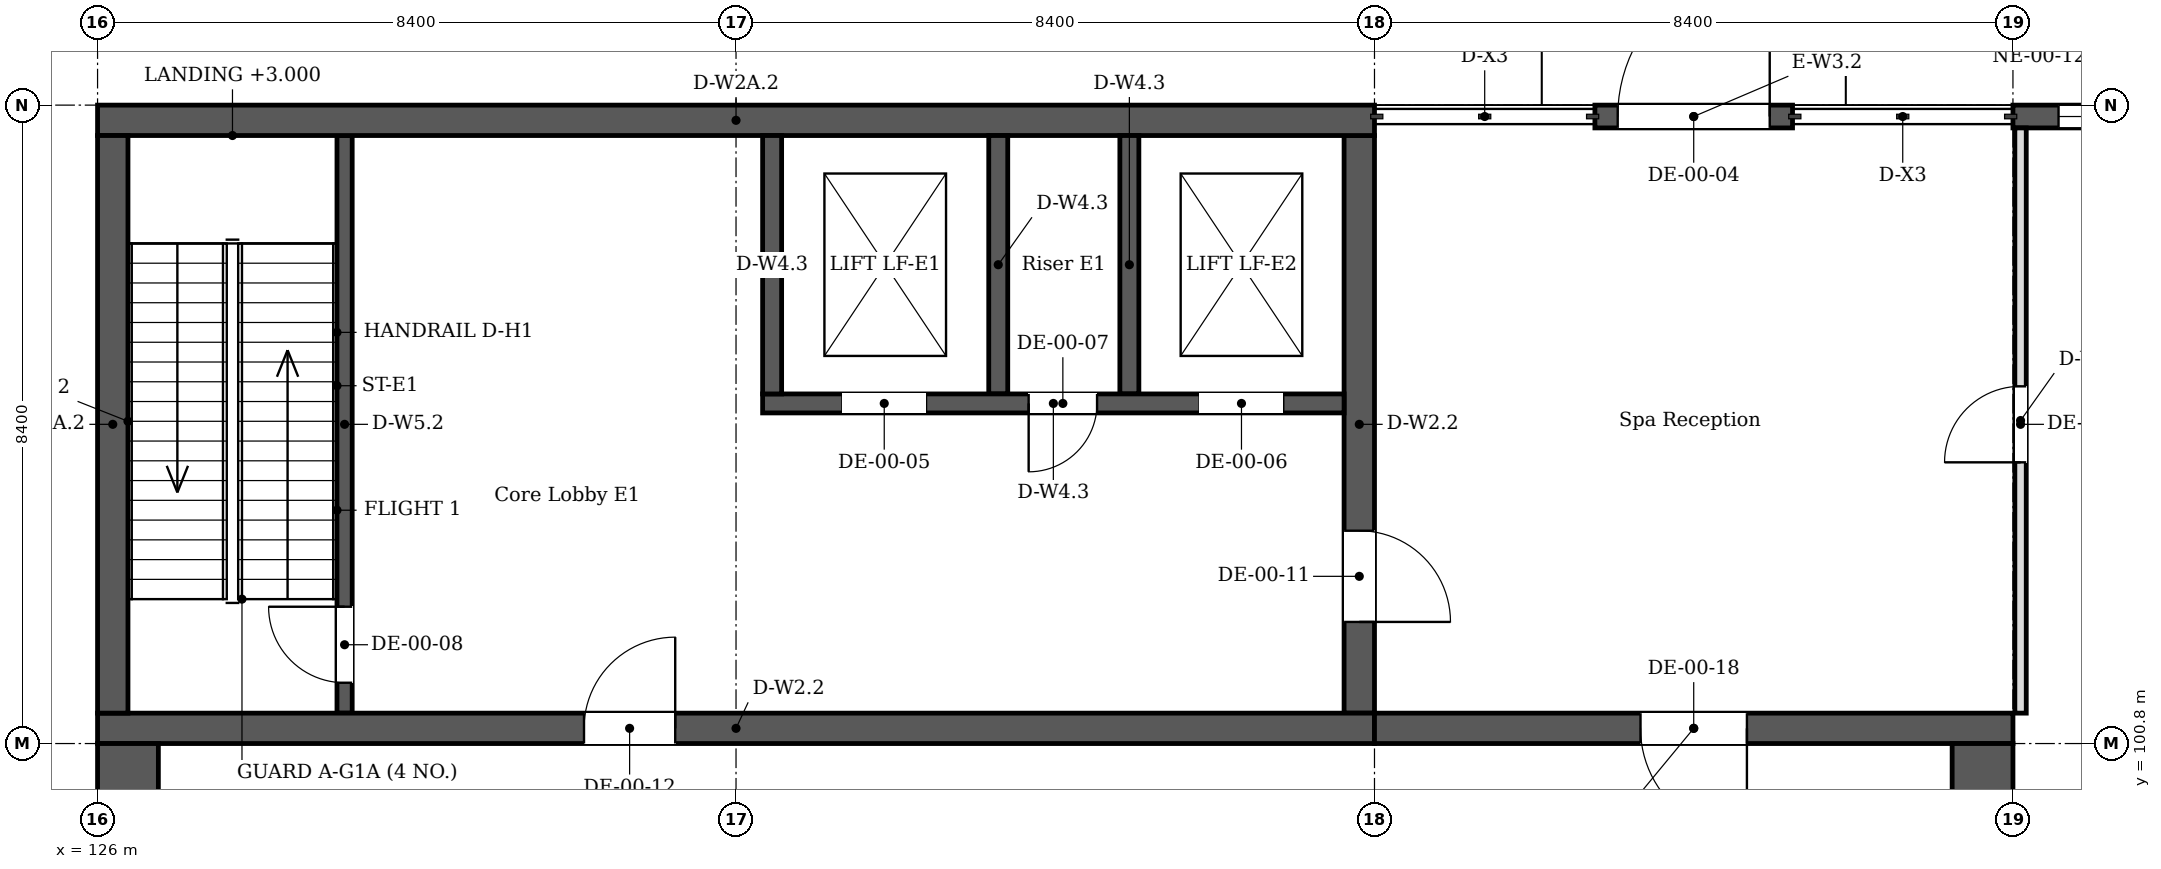
"""IFC4 building model, lengths in metres.
Left out: names, types, materials, properties, quantities, classifications, styles, units other than length and angle.
Written with IfcOpenShell. Run it as: python <this file> out.ifc"""

import sys

from ifc_helpers import new_model, si_unit, direction, frame, frame_2d, origin, place, context, subcontext, project, spatial, rectangle, extrude, element, fill, save


model = new_model("IFC4")
c1 = context("Model", 3, precision=1e-05, world=origin(), true_north=direction((0.0, 1.0)))
c2 = subcontext(c1, "Body", "Model", "MODEL_VIEW")
j1 = project(units=[si_unit("LENGTHUNIT", "METRE"), si_unit("PLANEANGLEUNIT", "RADIAN")], contexts=[c1])
p1 = place(None, origin())
s1 = spatial("IfcSite", under=j1, at=p1, CompositionType="ELEMENT")
p2 = place(p1, origin())
s2 = spatial("IfcBuilding", under=s1, at=p2, CompositionType="ELEMENT")
p3 = place(p2, origin())
s3 = spatial("IfcBuildingStorey", under=s2, at=p3, CompositionType="ELEMENT", Elevation=0.0)
p4 = place(p3, frame((126.4, 75.8, 0.0), z_axis=(0.0, 0.0, 1.0), x_axis=(0.0, 1.0, 0.0)))
e1 = element("IfcWall", 1, at=p4, inside=s3, PredefinedType="SOLIDWALL", context=c2, shape_type="SweptSolid", body=[
    extrude(rectangle(XDim=25.0, YDim=0.8, at=frame_2d((12.5, 0.0))), origin(), (0.0, 0.0, 1.0), 5.963),
])
p5 = place(p4, frame((3.6, 0.0, 0.0)))
e2 = element("IfcOpeningElement", 2, at=p5, cuts=e1, PredefinedType="OPENING", context=c2, shape_type="SweptSolid", body=[
    extrude(rectangle(XDim=1.2, YDim=2.1, at=frame_2d((0.6, 1.05))), frame((0.0, 0.41, 0.0), z_axis=(0.0, -1.0, 0.0), x_axis=(1.0, 0.0, 0.0)), (0.0, 0.0, 1.0), 0.82),
])
p6 = place(p4, frame((19.6, 0.0, 0.0)))
e3 = element("IfcOpeningElement", 3, at=p6, cuts=e1, PredefinedType="OPENING", context=c2, shape_type="SweptSolid", body=[
    extrude(rectangle(XDim=1.2, YDim=2.1, at=frame_2d((0.6, 1.05))), frame((0.0, 0.41, 0.0), z_axis=(0.0, -1.0, 0.0), x_axis=(1.0, 0.0, 0.0)), (0.0, 0.0, 1.0), 0.82),
])
p7 = place(p4, frame((7.0, 0.0, 3.8)))
e4 = element("IfcOpeningElement", 4, at=p7, cuts=e1, PredefinedType="OPENING", context=c2, shape_type="SweptSolid", body=[
    extrude(rectangle(XDim=2.4, YDim=1.2, at=frame_2d((1.2, 0.6))), frame((0.0, 0.41, 0.0), z_axis=(0.0, -1.0, 0.0), x_axis=(1.0, 0.0, 0.0)), (0.0, 0.0, 1.0), 0.82),
])
p8 = place(p4, frame((15.0, 0.0, 3.8)))
e5 = element("IfcOpeningElement", 5, at=p8, cuts=e1, PredefinedType="OPENING", context=c2, shape_type="SweptSolid", body=[
    extrude(rectangle(XDim=2.4, YDim=1.2, at=frame_2d((1.2, 0.6))), frame((0.0, 0.41, 0.0), z_axis=(0.0, -1.0, 0.0), x_axis=(1.0, 0.0, 0.0)), (0.0, 0.0, 1.0), 0.82),
])
p9 = place(p3, frame((150.8, 75.8, 0.0), z_axis=(0.0, 0.0, 1.0), x_axis=(0.0, 1.0, 0.0)))
e6 = element("IfcWall", 6, at=p9, inside=s3, PredefinedType="SOLIDWALL", context=c2, shape_type="SweptSolid", body=[
    extrude(rectangle(XDim=25.0, YDim=0.8, at=frame_2d((12.5, 0.0))), origin(), (0.0, 0.0, 1.0), 5.963),
])
p10 = place(p9, frame((9.0, 0.0, 3.8)))
e7 = element("IfcOpeningElement", 7, at=p10, cuts=e6, PredefinedType="OPENING", context=c2, shape_type="SweptSolid", body=[
    extrude(rectangle(XDim=2.4, YDim=1.2, at=frame_2d((1.2, 0.6))), frame((0.0, 0.41, 0.0), z_axis=(0.0, -1.0, 0.0), x_axis=(1.0, 0.0, 0.0)), (0.0, 0.0, 1.0), 0.82),
])
p11 = place(p9, frame((17.0, 0.0, 3.8)))
e8 = element("IfcOpeningElement", 8, at=p11, cuts=e6, PredefinedType="OPENING", context=c2, shape_type="SweptSolid", body=[
    extrude(rectangle(XDim=2.4, YDim=1.2, at=frame_2d((1.2, 0.6))), frame((0.0, 0.41, 0.0), z_axis=(0.0, -1.0, 0.0), x_axis=(1.0, 0.0, 0.0)), (0.0, 0.0, 1.0), 0.82),
])
p12 = place(p9, frame((11.5, 0.0, 0.0)))
e9 = element("IfcOpeningElement", 9, at=p12, cuts=e6, PredefinedType="OPENING", context=c2, shape_type="SweptSolid", body=[
    extrude(rectangle(XDim=1.4, YDim=2.4, at=frame_2d((0.7, 1.2))), frame((0.0, 0.41, 0.0), z_axis=(0.0, -1.0, 0.0), x_axis=(1.0, 0.0, 0.0)), (0.0, 0.0, 1.0), 0.82),
])
p13 = place(p9, frame((19.5, 0.0, 0.0)))
e10 = element("IfcOpeningElement", 10, at=p13, cuts=e6, PredefinedType="OPENING", context=c2, shape_type="SweptSolid", body=[
    extrude(rectangle(XDim=1.4, YDim=2.4, at=frame_2d((0.7, 1.2))), frame((0.0, 0.41, 0.0), z_axis=(0.0, -1.0, 0.0), x_axis=(1.0, 0.0, 0.0)), (0.0, 0.0, 1.0), 0.82),
])
p14 = place(p3, frame((126.0, 101.0, 0.0), z_axis=(0.0, 0.0, 1.0), x_axis=(1.0, 0.0, 0.0)))
e11 = element("IfcWall", 11, at=p14, inside=s3, PredefinedType="SOLIDWALL", context=c2, shape_type="SweptSolid", body=[
    extrude(rectangle(XDim=16.8, YDim=0.4, at=frame_2d((8.4, 0.0))), origin(), (0.0, 0.0, 1.0), 5.72),
])
p15 = place(p14, frame((6.4, 0.0, 0.0)))
e12 = element("IfcOpeningElement", 12, at=p15, cuts=e11, PredefinedType="OPENING", context=c2, shape_type="SweptSolid", body=[
    extrude(rectangle(XDim=1.2, YDim=2.1, at=frame_2d((0.6, 1.05))), frame((0.0, 0.21, 0.0), z_axis=(0.0, -1.0, 0.0), x_axis=(1.0, 0.0, 0.0)), (0.0, 0.0, 1.0), 0.42),
])
p16 = place(p3, frame((126.0, 109.0, 0.0), z_axis=(0.0, 0.0, 1.0), x_axis=(1.0, 0.0, 0.0)))
e13 = element("IfcWall", 13, at=p16, inside=s3, PredefinedType="SOLIDWALL", context=c2, shape_type="SweptSolid", body=[
    extrude(rectangle(XDim=16.8, YDim=0.4, at=frame_2d((8.4, 0.0))), origin(), (0.0, 0.0, 1.0), 5.72),
])
p17 = place(p3, frame((126.2, 101.2, 0.0), z_axis=(0.0, 0.0, 1.0), x_axis=(0.0, 1.0, 0.0)))
e14 = element("IfcWall", 14, at=p17, inside=s3, PredefinedType="SOLIDWALL", context=c2, shape_type="SweptSolid", body=[
    extrude(rectangle(XDim=7.6, YDim=0.4, at=frame_2d((3.8, 0.0))), origin(), (0.0, 0.0, 1.0), 5.72),
])
p18 = place(p3, frame((142.6, 101.2, 0.0), z_axis=(0.0, 0.0, 1.0), x_axis=(0.0, 1.0, 0.0)))
e15 = element("IfcWall", 15, at=p18, inside=s3, PredefinedType="SOLIDWALL", context=c2, shape_type="SweptSolid", body=[
    extrude(rectangle(XDim=7.6, YDim=0.4, at=frame_2d((3.8, 0.0))), origin(), (0.0, 0.0, 1.0), 5.72),
])
p19 = place(p18, frame((1.2, 0.0, 0.0)))
e16 = element("IfcOpeningElement", 16, at=p19, cuts=e15, PredefinedType="OPENING", context=c2, shape_type="SweptSolid", body=[
    extrude(rectangle(XDim=1.2, YDim=2.1, at=frame_2d((0.6, 1.05))), frame((0.0, 0.21, 0.0), z_axis=(0.0, -1.0, 0.0), x_axis=(1.0, 0.0, 0.0)), (0.0, 0.0, 1.0), 0.42),
])
p20 = place(p3, frame((129.25, 101.2, 0.0), z_axis=(0.0, 0.0, 1.0), x_axis=(0.0, 1.0, 0.0)))
e17 = element("IfcWall", 17, at=p20, inside=s3, PredefinedType="SOLIDWALL", context=c2, shape_type="SweptSolid", body=[
    extrude(rectangle(XDim=7.6, YDim=0.2, at=frame_2d((3.8, 0.0))), origin(), (0.0, 0.0, 1.0), 5.72),
])
p21 = place(p20, frame((0.4, 0.0, 0.0)))
e18 = element("IfcOpeningElement", 18, at=p21, cuts=e17, PredefinedType="OPENING", context=c2, shape_type="SweptSolid", body=[
    extrude(rectangle(XDim=1.0, YDim=2.1, at=frame_2d((0.5, 1.05))), frame((0.0, 0.11, 0.0), z_axis=(0.0, -1.0, 0.0), x_axis=(1.0, 0.0, 0.0)), (0.0, 0.0, 1.0), 0.22),
])
p22 = place(p3, frame((142.8, 101.0, 0.0), z_axis=(0.0, 0.0, 1.0), x_axis=(1.0, 0.0, 0.0)))
e19 = element("IfcWall", 19, at=p22, inside=s3, PredefinedType="SOLIDWALL", context=c2, shape_type="SweptSolid", body=[
    extrude(rectangle(XDim=8.4, YDim=0.4, at=frame_2d((4.2, 0.0))), origin(), (0.0, 0.0, 1.0), 5.72),
])
p23 = place(p22, frame((3.5, 0.0, 0.0)))
e20 = element("IfcOpeningElement", 20, at=p23, cuts=e19, PredefinedType="OPENING", context=c2, shape_type="SweptSolid", body=[
    extrude(rectangle(XDim=1.4, YDim=2.4, at=frame_2d((0.7, 1.2))), frame((0.0, 0.21, 0.0), z_axis=(0.0, -1.0, 0.0), x_axis=(1.0, 0.0, 0.0)), (0.0, 0.0, 1.0), 0.42),
])
p24 = place(p3, frame((134.75, 105.275, -1.4), z_axis=(0.0, 0.0, 1.0), x_axis=(1.0, 0.0, 0.0)))
e21 = element("IfcWall", 21, at=p24, inside=s3, PredefinedType="SOLIDWALL", context=c2, shape_type="SweptSolid", body=[
    extrude(rectangle(XDim=7.65, YDim=0.25, at=frame_2d((3.825, 0.0))), origin(), (0.0, 0.0, 1.0), 7.12),
])
p25 = place(p24, frame((1.05, 0.0, 1.4)))
e22 = element("IfcOpeningElement", 22, at=p25, cuts=e21, PredefinedType="OPENING", context=c2, shape_type="SweptSolid", body=[
    extrude(rectangle(XDim=1.1, YDim=2.1, at=frame_2d((0.55, 1.05))), frame((0.0, 0.135, 0.0), z_axis=(0.0, -1.0, 0.0), x_axis=(1.0, 0.0, 0.0)), (0.0, 0.0, 1.0), 0.27),
])
p26 = place(p24, frame((5.75, 0.0, 1.4)))
e23 = element("IfcOpeningElement", 23, at=p26, cuts=e21, PredefinedType="OPENING", context=c2, shape_type="SweptSolid", body=[
    extrude(rectangle(XDim=1.1, YDim=2.1, at=frame_2d((0.55, 1.05))), frame((0.0, 0.135, 0.0), z_axis=(0.0, -1.0, 0.0), x_axis=(1.0, 0.0, 0.0)), (0.0, 0.0, 1.0), 0.27),
])
p27 = place(p24, frame((3.5, 0.0, 1.4)))
e24 = element("IfcOpeningElement", 24, at=p27, cuts=e21, PredefinedType="OPENING", context=c2, shape_type="SweptSolid", body=[
    extrude(rectangle(XDim=0.9, YDim=2.1, at=frame_2d((0.45, 1.05))), frame((0.0, 0.135, 0.0), z_axis=(0.0, -1.0, 0.0), x_axis=(1.0, 0.0, 0.0)), (0.0, 0.0, 1.0), 0.27),
])
for number, where, z_axis, x_axis in (
    (25, (134.875, 105.4, -1.4), (0.0, 0.0, 1.0), (0.0, 1.0, 0.0)),
    (26, (137.85, 105.4, -1.4), (0.0, 0.0, 1.0), (0.0, 1.0, 0.0)),
    (27, (139.575, 105.4, -1.4), (0.0, 0.0, 1.0), (0.0, 1.0, 0.0)),
):
    element("IfcWall", number, at=place(p3, frame(where, z_axis=z_axis, x_axis=x_axis)), inside=s3, PredefinedType="SOLIDWALL", context=c2, shape_type="SweptSolid", body=[
        extrude(rectangle(XDim=3.4, YDim=0.25, at=frame_2d((1.7, 0.0))), origin(), (0.0, 0.0, 1.0), 7.12),
    ])
p28 = place(p3, frame((145.7, 109.05, 0.0), z_axis=(0.0, 0.0, 1.0), x_axis=(1.0, 0.0, 0.0)))
e28 = element("IfcWall", 28, at=p28, inside=s3, PredefinedType="SOLIDWALL", context=c2, shape_type="SweptSolid", body=[
    extrude(rectangle(XDim=2.6, YDim=0.3, at=frame_2d((1.3, 0.0))), origin(), (0.0, 0.0, 1.0), 5.72),
])
p29 = place(p28, frame((0.3, 0.0, 0.0)))
e29 = element("IfcOpeningElement", 29, at=p29, cuts=e28, PredefinedType="OPENING", context=c2, shape_type="SweptSolid", body=[
    extrude(rectangle(XDim=2.0, YDim=2.4, at=frame_2d((1.0, 1.2))), frame((0.0, 0.16, 0.0), z_axis=(0.0, -1.0, 0.0), x_axis=(1.0, 0.0, 0.0)), (0.0, 0.0, 1.0), 0.32),
])
p30 = place(p3, frame((151.2, 109.05, 0.0), z_axis=(0.0, 0.0, 1.0), x_axis=(1.0, 0.0, 0.0)))
e30 = element("IfcWall", 30, at=p30, inside=s3, PredefinedType="SOLIDWALL", context=c2, shape_type="SweptSolid", body=[
    extrude(rectangle(XDim=6.0, YDim=0.3, at=frame_2d((3.0, 0.0))), origin(), (0.0, 0.0, 1.0), 5.72),
])
p31 = place(p30, frame((0.6, 0.0, 1.5)))
e31 = element("IfcOpeningElement", 31, at=p31, cuts=e30, PredefinedType="OPENING", context=c2, shape_type="SweptSolid", body=[
    extrude(rectangle(XDim=1.2, YDim=1.2, at=frame_2d((0.6, 0.6))), frame((0.0, 0.16, 0.0), z_axis=(0.0, -1.0, 0.0), x_axis=(1.0, 0.0, 0.0)), (0.0, 0.0, 1.0), 0.32),
])
p32 = place(p30, frame((3.7, 0.0, 1.5)))
e32 = element("IfcOpeningElement", 32, at=p32, cuts=e30, PredefinedType="OPENING", context=c2, shape_type="SweptSolid", body=[
    extrude(rectangle(XDim=1.2, YDim=1.2, at=frame_2d((0.6, 0.6))), frame((0.0, 0.16, 0.0), z_axis=(0.0, -1.0, 0.0), x_axis=(1.0, 0.0, 0.0)), (0.0, 0.0, 1.0), 0.32),
])
p33 = place(p3, frame((151.3, 101.2, 0.0), z_axis=(0.0, 0.0, 1.0), x_axis=(0.0, 1.0, 0.0)))
e33 = element("IfcWall", 33, at=p33, inside=s3, PredefinedType="PARTITIONING", context=c2, shape_type="SweptSolid", body=[
    extrude(rectangle(XDim=7.7, YDim=0.15, at=frame_2d((3.85, 0.0))), origin(), (0.0, 0.0, 1.0), 5.72),
])
p34 = place(p33, frame((3.3, 0.0, 0.0)))
e34 = element("IfcOpeningElement", 34, at=p34, cuts=e33, PredefinedType="OPENING", context=c2, shape_type="SweptSolid", body=[
    extrude(rectangle(XDim=1.0, YDim=2.1, at=frame_2d((0.5, 1.05))), frame((0.0, 0.085, 0.0), z_axis=(0.0, -1.0, 0.0), x_axis=(1.0, 0.0, 0.0)), (0.0, 0.0, 1.0), 0.17),
])
p35 = place(p29, origin())
e35 = element("IfcDoor", 35, at=p35, inside=s3, OperationType="DOUBLE_DOOR_SINGLE_SWING", PredefinedType="DOOR", context=c2, shape_type="SweptSolid", body=[
    extrude(rectangle(XDim=2.0, YDim=2.4, at=frame_2d((1.0, 1.2))), frame((0.0, 0.025, 0.0), z_axis=(0.0, -1.0, 0.0), x_axis=(1.0, 0.0, 0.0)), (0.0, 0.0, 1.0), 0.05),
])
fill(e29, e35)
p36 = place(p31, origin())
e36 = element("IfcWindow", 36, at=p36, inside=s3, PartitioningType="SINGLE_PANEL", PredefinedType="WINDOW", context=c2, shape_type="SweptSolid", body=[
    extrude(rectangle(XDim=1.2, YDim=1.2, at=frame_2d((0.6, 0.6))), frame((0.0, 0.03, 0.0), z_axis=(0.0, -1.0, 0.0), x_axis=(1.0, 0.0, 0.0)), (0.0, 0.0, 1.0), 0.06),
])
fill(e31, e36)
p37 = place(p25, origin())
e37 = element("IfcDoor", 37, at=p37, inside=s3, OperationType="DOUBLE_DOOR_SLIDING", PredefinedType="DOOR", context=c2, shape_type="SweptSolid", body=[
    extrude(rectangle(XDim=1.1, YDim=2.1, at=frame_2d((0.55, 1.05))), frame((0.0, 0.025, 0.0), z_axis=(0.0, -1.0, 0.0), x_axis=(1.0, 0.0, 0.0)), (0.0, 0.0, 1.0), 0.05),
])
fill(e22, e37)
p38 = place(p26, origin())
e38 = element("IfcDoor", 38, at=p38, inside=s3, OperationType="DOUBLE_DOOR_SLIDING", PredefinedType="DOOR", context=c2, shape_type="SweptSolid", body=[
    extrude(rectangle(XDim=1.1, YDim=2.1, at=frame_2d((0.55, 1.05))), frame((0.0, 0.025, 0.0), z_axis=(0.0, -1.0, 0.0), x_axis=(1.0, 0.0, 0.0)), (0.0, 0.0, 1.0), 0.05),
])
fill(e23, e38)
p39 = place(p27, origin())
e39 = element("IfcDoor", 39, at=p39, inside=s3, OperationType="SINGLE_SWING_LEFT", PredefinedType="DOOR", context=c2, shape_type="SweptSolid", body=[
    extrude(rectangle(XDim=0.9, YDim=2.1, at=frame_2d((0.45, 1.05))), frame((0.0, 0.025, 0.0), z_axis=(0.0, -1.0, 0.0), x_axis=(1.0, 0.0, 0.0)), (0.0, 0.0, 1.0), 0.05),
])
fill(e24, e39)
p40 = place(p21, origin())
e40 = element("IfcDoor", 40, at=p40, inside=s3, OperationType="SINGLE_SWING_LEFT", PredefinedType="DOOR", context=c2, shape_type="SweptSolid", body=[
    extrude(rectangle(XDim=1.0, YDim=2.1, at=frame_2d((0.5, 1.05))), frame((0.0, 0.025, 0.0), z_axis=(0.0, -1.0, 0.0), x_axis=(1.0, 0.0, 0.0)), (0.0, 0.0, 1.0), 0.05),
])
fill(e18, e40)
p41 = place(p19, origin())
e41 = element("IfcDoor", 41, at=p41, inside=s3, OperationType="SINGLE_SWING_LEFT", PredefinedType="DOOR", context=c2, shape_type="SweptSolid", body=[
    extrude(rectangle(XDim=1.2, YDim=2.1, at=frame_2d((0.6, 1.05))), frame((0.0, 0.025, 0.0), z_axis=(0.0, -1.0, 0.0), x_axis=(1.0, 0.0, 0.0)), (0.0, 0.0, 1.0), 0.05),
])
fill(e16, e41)
p42 = place(p15, origin())
e42 = element("IfcDoor", 42, at=p42, inside=s3, OperationType="SINGLE_SWING_LEFT", PredefinedType="DOOR", context=c2, shape_type="SweptSolid", body=[
    extrude(rectangle(XDim=1.2, YDim=2.1, at=frame_2d((0.6, 1.05))), frame((0.0, 0.025, 0.0), z_axis=(0.0, -1.0, 0.0), x_axis=(1.0, 0.0, 0.0)), (0.0, 0.0, 1.0), 0.05),
])
fill(e12, e42)
p43 = place(p34, origin())
e43 = element("IfcDoor", 43, at=p43, inside=s3, OperationType="SINGLE_SWING_LEFT", PredefinedType="DOOR", context=c2, shape_type="SweptSolid", body=[
    extrude(rectangle(XDim=1.0, YDim=2.1, at=frame_2d((0.5, 1.05))), frame((0.0, 0.025, 0.0), z_axis=(0.0, -1.0, 0.0), x_axis=(1.0, 0.0, 0.0)), (0.0, 0.0, 1.0), 0.05),
])
fill(e34, e43)
p44 = place(p23, origin())
e44 = element("IfcDoor", 44, at=p44, inside=s3, OperationType="DOUBLE_DOOR_SINGLE_SWING", PredefinedType="DOOR", context=c2, shape_type="SweptSolid", body=[
    extrude(rectangle(XDim=1.4, YDim=2.4, at=frame_2d((0.7, 1.2))), frame((0.0, 0.025, 0.0), z_axis=(0.0, -1.0, 0.0), x_axis=(1.0, 0.0, 0.0)), (0.0, 0.0, 1.0), 0.05),
])
fill(e20, e44)
save(model, sys.argv[1])
